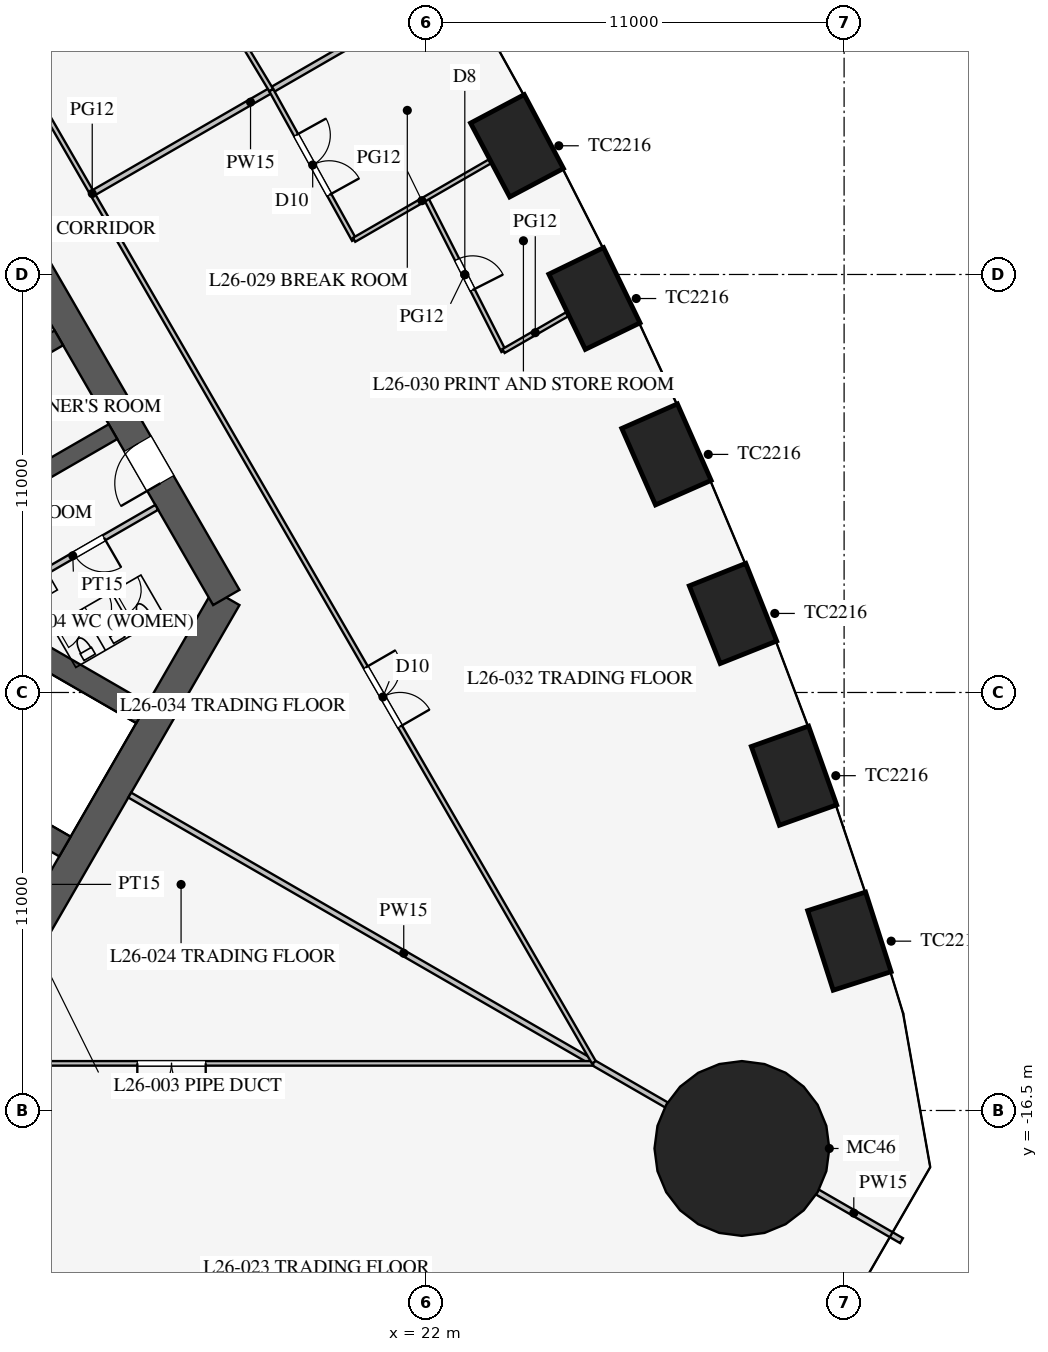
"""IFC4 building model, lengths in metres.
Left out: names, types, materials, properties, quantities, classifications, styles, units other than length and angle.
Written with IfcOpenShell. Run it as: python <this file> out.ifc"""

import sys

from ifc_helpers import new_model, si_unit, direction, frame, frame_2d, origin, origin_2d, place, context, subcontext, project, spatial, rectangle, circle, extrude, element, fill, save


model = new_model("IFC4")
c1 = context("Model", 3, precision=1e-05, world=origin(), true_north=direction((0.0, 1.0)))
c2 = subcontext(c1, "Body", "Model", "MODEL_VIEW")
j1 = project(units=[si_unit("LENGTHUNIT", "METRE"), si_unit("PLANEANGLEUNIT", "RADIAN")], contexts=[c1])
p1 = place(None, origin())
s1 = spatial("IfcSite", under=j1, at=p1, CompositionType="ELEMENT")
p2 = place(p1, origin())
s2 = spatial("IfcBuilding", under=s1, at=p2, CompositionType="ELEMENT")
p3 = place(p2, frame((0.0, 0.0, 115.7)))
s3 = spatial("IfcBuildingStorey", under=s2, at=p3, CompositionType="ELEMENT", Elevation=115.7)
for number, where, z_axis, x_axis in (
    (1, (33.139, -12.044, 0.0), (0.0, 0.0, 1.0), (-0.305, 0.952, 0.0)),
    (2, (31.682, -7.689, 0.0), (0.0, 0.0, 1.0), (-0.336, 0.942, 0.0)),
    (3, (30.077, -3.42, 0.0), (0.0, 0.0, 1.0), (-0.37, 0.929, 0.0)),
    (4, (28.325, 0.765, 0.0), (0.0, 0.0, 1.0), (-0.403, 0.915, 0.0)),
    (5, (26.43, 4.867, 0.0), (0.0, 0.0, 1.0), (-0.436, 0.9, 0.0)),
    (6, (24.393, 8.887, 0.0), (0.0, 0.0, 1.0), (-0.468, 0.883, 0.0)),
):
    element("IfcColumn", number, at=place(p3, frame(where, z_axis=z_axis, x_axis=x_axis)), inside=s3, PredefinedType="COLUMN", context=c2, shape_type="SweptSolid", body=[
        extrude(rectangle(XDim=2.2, YDim=1.6, at=origin_2d()), origin(), (0.0, 0.0, 1.0), 4.2),
    ])
p4 = place(p3, frame((30.311, -17.5, 0.0), z_axis=(0.0, 0.0, 1.0), x_axis=(1.0, 0.0, 0.0)))
e7 = element("IfcColumn", 7, at=p4, inside=s3, PredefinedType="COLUMN", context=c2, shape_type="SweptSolid", body=[
    extrude(circle(Radius=2.3, at=origin_2d()), origin(), (0.0, 0.0, 1.0), 4.2),
])
p5 = place(p3, frame((10.97, -13.0, 0.0), z_axis=(0.0, 0.0, 1.0), x_axis=(0.499995765644, 0.866027848477, 0.0)))
e8 = element("IfcWall", 8, at=p5, inside=s3, PredefinedType="SHEAR", context=c2, shape_type="SweptSolid", body=[
    extrude(rectangle(XDim=11.547, YDim=0.8, at=frame_2d((5.773, 0.0))), origin(), (0.0, 0.0, 1.0), 4.2),
])
p6 = place(p3, frame((16.743, -3.0, 0.0), z_axis=(0.0, 0.0, 1.0), x_axis=(-0.500002442456, 0.866023993627, 0.0)))
e9 = element("IfcWall", 9, at=p6, inside=s3, PredefinedType="SHEAR", context=c2, shape_type="SweptSolid", body=[
    extrude(rectangle(XDim=21.939, YDim=0.8, at=frame_2d((10.97, 0.0))), origin(), (0.0, 0.0, 1.0), 4.2),
])
p7 = place(p6, frame((17.27, 0.0, 0.0)))
e10 = element("IfcOpeningElement", 10, at=p7, cuts=e9, PredefinedType="OPENING", context=c2, shape_type="SweptSolid", body=[
    extrude(rectangle(XDim=1.2, YDim=2.1, at=frame_2d((0.6, 1.05))), frame((0.0, 0.41, 0.0), z_axis=(0.0, -1.0, 0.0), x_axis=(1.0, 0.0, 0.0)), (0.0, 0.0, 1.0), 0.82),
])
p8 = place(p6, frame((3.47, 0.0, 0.0)))
e11 = element("IfcOpeningElement", 11, at=p8, cuts=e9, PredefinedType="OPENING", context=c2, shape_type="SweptSolid", body=[
    extrude(rectangle(XDim=1.2, YDim=2.1, at=frame_2d((0.6, 1.05))), frame((0.0, 0.41, 0.0), z_axis=(0.0, -1.0, 0.0), x_axis=(1.0, 0.0, 0.0)), (0.0, 0.0, 1.0), 0.82),
])
for number, where, z_axis, x_axis in (
    (12, (11.532, 0.076, 0.0), (0.0, 0.0, 1.0), (0.866, 0.5, 0.0)),
    (13, (10.107, 2.544, 0.0), (0.0, 0.0, 1.0), (0.866, 0.5, 0.0)),
):
    element("IfcWall", number, at=place(p3, frame(where, z_axis=z_axis, x_axis=x_axis)), inside=s3, PredefinedType="SHEAR", context=c2, shape_type="SweptSolid", body=[
        extrude(rectangle(XDim=2.575, YDim=0.45, at=frame_2d((1.288, 0.0))), origin(), (0.0, 0.0, 1.0), 4.2),
    ])
for number, where, z_axis, x_axis in (
    (14, (4.638, -5.016, 0.0), (0.0, 0.0, 1.0), (0.866, -0.5, 0.0)),
    (15, (6.663, -1.509, 0.0), (0.0, 0.0, 1.0), (0.866, -0.5, 0.0)),
):
    element("IfcWall", number, at=place(p3, frame(where, z_axis=z_axis, x_axis=x_axis)), inside=s3, PredefinedType="SHEAR", context=c2, shape_type="SweptSolid", body=[
        extrude(rectangle(XDim=9.075, YDim=0.6, at=frame_2d((4.538, 0.0))), origin(), (0.0, 0.0, 1.0), 4.2),
    ])
p9 = place(p3, frame((10.495, -3.178, 0.0), z_axis=(0.0, 0.0, 1.0), x_axis=(0.86602216432, 0.500005610874, 0.0)))
e16 = element("IfcWall", 16, at=p9, inside=s3, PredefinedType="PARTITIONING", context=c2, shape_type="SweptSolid", body=[
    extrude(rectangle(XDim=5.1, YDim=0.15, at=frame_2d((2.55, 0.0))), origin(), (0.0, 0.0, 1.0), 4.0),
])
p10 = place(p9, frame((2.6, 0.0, 0.0)))
e17 = element("IfcOpeningElement", 17, at=p10, cuts=e16, PredefinedType="OPENING", context=c2, shape_type="SweptSolid", body=[
    extrude(rectangle(XDim=0.9, YDim=2.1, at=frame_2d((0.45, 1.05))), frame((0.0, 0.085, 0.0), z_axis=(0.0, -1.0, 0.0), x_axis=(1.0, 0.0, 0.0)), (0.0, 0.0, 1.0), 0.17),
])
p11 = place(p3, frame((14.203, -8.2, 0.0), z_axis=(0.0, 0.0, 1.0), x_axis=(0.866024668836, -0.500001272966, 0.0)))
e18 = element("IfcWall", 18, at=p11, inside=s3, PredefinedType="PARTITIONING", context=c2, shape_type="SweptSolid", body=[
    extrude(rectangle(XDim=16.65, YDim=0.15, at=frame_2d((8.325, 0.0))), origin(), (0.0, 0.0, 1.0), 2.3),
])
p12 = place(p3, frame((32.0, -18.475, 0.0), z_axis=(0.0, 0.0, 1.0), x_axis=(0.866042548026, -0.499970304126, 0.0)))
e19 = element("IfcWall", 19, at=p12, inside=s3, PredefinedType="PARTITIONING", context=c2, shape_type="SweptSolid", body=[
    extrude(rectangle(XDim=2.899, YDim=0.15, at=frame_2d((1.45, 0.0))), origin(), (0.0, 0.0, 1.0), 2.3),
])
p13 = place(p3, frame((-26.398, -15.26, 0.0), z_axis=(0.0, 0.0, 1.0), x_axis=(1.0, 0.0, 0.0)))
e20 = element("IfcWall", 20, at=p13, inside=s3, PredefinedType="PARTITIONING", context=c2, shape_type="SweptSolid", body=[
    extrude(rectangle(XDim=52.796, YDim=0.12, at=frame_2d((26.398, 0.0))), origin(), (0.0, 0.0, 1.0), 2.9),
])
p14 = place(p13, frame((10.2, 0.0, 0.15)))
e21 = element("IfcOpeningElement", 21, at=p14, cuts=e20, PredefinedType="OPENING", context=c2, shape_type="SweptSolid", body=[
    extrude(rectangle(XDim=1.8, YDim=2.1, at=frame_2d((0.9, 1.05))), frame((0.0, 0.07, 0.0), z_axis=(0.0, -1.0, 0.0), x_axis=(1.0, 0.0, 0.0)), (0.0, 0.0, 1.0), 0.14),
])
p15 = place(p13, frame((40.8, 0.0, 0.15)))
e22 = element("IfcOpeningElement", 22, at=p15, cuts=e20, PredefinedType="OPENING", context=c2, shape_type="SweptSolid", body=[
    extrude(rectangle(XDim=1.8, YDim=2.1, at=frame_2d((0.9, 1.05))), frame((0.0, 0.07, 0.0), z_axis=(0.0, -1.0, 0.0), x_axis=(1.0, 0.0, 0.0)), (0.0, 0.0, 1.0), 0.14),
])
p16 = place(p3, frame((13.268, 7.66, 0.0), z_axis=(0.0, 0.0, 1.0), x_axis=(0.866013963754, 0.500019814191, 0.0)))
e23 = element("IfcWall", 23, at=p16, inside=s3, PredefinedType="PARTITIONING", context=c2, shape_type="SweptSolid", body=[
    extrude(rectangle(XDim=9.5, YDim=0.15, at=frame_2d((4.75, 0.0))), origin(), (0.0, 0.0, 1.0), 3.2),
])
p17 = place(p3, frame((26.415, -15.231, 0.0), z_axis=(0.0, 0.0, 1.0), x_axis=(-0.50000091641, 0.866024874695, 0.0)))
e24 = element("IfcWall", 24, at=p17, inside=s3, PredefinedType="PARTITIONING", context=c2, shape_type="SweptSolid", body=[
    extrude(rectangle(XDim=52.796, YDim=0.12, at=frame_2d((26.398, 0.0))), origin(), (0.0, 0.0, 1.0), 2.9),
])
p18 = place(p17, frame((10.2, 0.0, 0.15)))
e25 = element("IfcOpeningElement", 25, at=p18, cuts=e24, PredefinedType="OPENING", context=c2, shape_type="SweptSolid", body=[
    extrude(rectangle(XDim=1.8, YDim=2.1, at=frame_2d((0.9, 1.05))), frame((0.0, 0.07, 0.0), z_axis=(0.0, -1.0, 0.0), x_axis=(1.0, 0.0, 0.0)), (0.0, 0.0, 1.0), 0.14),
])
p19 = place(p17, frame((40.8, 0.0, 0.15)))
e26 = element("IfcOpeningElement", 26, at=p19, cuts=e24, PredefinedType="OPENING", context=c2, shape_type="SweptSolid", body=[
    extrude(rectangle(XDim=1.8, YDim=2.1, at=frame_2d((0.9, 1.05))), frame((0.0, 0.07, 0.0), z_axis=(0.0, -1.0, 0.0), x_axis=(1.0, 0.0, 0.0)), (0.0, 0.0, 1.0), 0.14),
])
p20 = place(p3, frame((17.927, 10.35, 0.0), z_axis=(0.0, 0.0, 1.0), x_axis=(-0.515548366618, 0.856860479703, 0.0)))
e27 = element("IfcWall", 27, at=p20, inside=s3, PredefinedType="PARTITIONING", context=c2, shape_type="SweptSolid", body=[
    extrude(rectangle(XDim=4.501, YDim=0.12, at=frame_2d((2.25, 0.0))), origin(), (0.0, 0.0, 1.0), 2.9),
])
p21 = place(p20, frame((1.75, 0.0, 0.15)))
e28 = element("IfcOpeningElement", 28, at=p21, cuts=e27, PredefinedType="OPENING", context=c2, shape_type="SweptSolid", body=[
    extrude(rectangle(XDim=1.0, YDim=2.1, at=frame_2d((0.5, 1.05))), frame((0.0, 0.07, 0.0), z_axis=(0.0, -1.0, 0.0), x_axis=(1.0, 0.0, 0.0)), (0.0, 0.0, 1.0), 0.14),
])
p22 = place(p3, frame((20.106, 6.412, 0.0), z_axis=(0.0, 0.0, 1.0), x_axis=(-0.484292898211, 0.874905931368, 0.0)))
e29 = element("IfcWall", 29, at=p22, inside=s3, PredefinedType="PARTITIONING", context=c2, shape_type="SweptSolid", body=[
    extrude(rectangle(XDim=4.501, YDim=0.12, at=frame_2d((2.25, 0.0))), origin(), (0.0, 0.0, 1.0), 2.9),
])
p23 = place(p22, frame((1.35, 0.0, 0.15)))
e30 = element("IfcOpeningElement", 30, at=p23, cuts=e29, PredefinedType="OPENING", context=c2, shape_type="SweptSolid", body=[
    extrude(rectangle(XDim=1.8, YDim=2.1, at=frame_2d((0.9, 1.05))), frame((0.0, 0.07, 0.0), z_axis=(0.0, -1.0, 0.0), x_axis=(1.0, 0.0, 0.0)), (0.0, 0.0, 1.0), 0.14),
])
p24 = place(p3, frame((24.037, 3.486, 0.0), z_axis=(0.0, 0.0, 1.0), x_axis=(-0.452428593635, 0.891800632239, 0.0)))
e31 = element("IfcWall", 31, at=p24, inside=s3, PredefinedType="PARTITIONING", context=c2, shape_type="SweptSolid", body=[
    extrude(rectangle(XDim=4.506, YDim=0.12, at=frame_2d((2.253, 0.0))), origin(), (0.0, 0.0, 1.0), 2.9),
])
p25 = place(p24, frame((1.8, 0.0, 0.15)))
e32 = element("IfcOpeningElement", 32, at=p25, cuts=e31, PredefinedType="OPENING", context=c2, shape_type="SweptSolid", body=[
    extrude(rectangle(XDim=0.9, YDim=2.1, at=frame_2d((0.45, 1.05))), frame((0.0, 0.07, 0.0), z_axis=(0.0, -1.0, 0.0), x_axis=(1.0, 0.0, 0.0)), (0.0, 0.0, 1.0), 0.14),
])
p26 = place(p3, frame((20.106, 6.412, 0.0), z_axis=(0.0, 0.0, 1.0), x_axis=(0.866016800201, 0.500014901547, 0.0)))
e33 = element("IfcWall", 33, at=p26, inside=s3, PredefinedType="PARTITIONING", context=c2, shape_type="SweptSolid", body=[
    extrude(rectangle(XDim=4.119, YDim=0.12, at=frame_2d((2.06, 0.0))), origin(), (0.0, 0.0, 1.0), 2.9),
])
p27 = place(p3, frame((24.037, 3.486, 0.0), z_axis=(0.0, 0.0, 1.0), x_axis=(0.866040295995, 0.499974205047, 0.0)))
e34 = element("IfcWall", 34, at=p27, inside=s3, PredefinedType="PARTITIONING", context=c2, shape_type="SweptSolid", body=[
    extrude(rectangle(XDim=1.931, YDim=0.12, at=frame_2d((0.965, 0.0))), origin(), (0.0, 0.0, 1.0), 2.9),
])
p28 = place(p10, frame((0.9, 0.0, 0.0), z_axis=(0.0, 0.0, 1.0), x_axis=(-1.0, 0.0, 0.0)))
e35 = element("IfcDoor", 35, at=p28, inside=s3, OperationType="SINGLE_SWING_LEFT", PredefinedType="DOOR", context=c2, shape_type="SweptSolid", body=[
    extrude(rectangle(XDim=0.9, YDim=2.1, at=frame_2d((0.45, 1.05))), frame((0.0, 0.025, 0.0), z_axis=(0.0, -1.0, 0.0), x_axis=(1.0, 0.0, 0.0)), (0.0, 0.0, 1.0), 0.05),
])
fill(e17, e35)
p29 = place(p8, origin())
e36 = element("IfcDoor", 36, at=p29, inside=s3, OperationType="SINGLE_SWING_LEFT", PredefinedType="DOOR", context=c2, shape_type="SweptSolid", body=[
    extrude(rectangle(XDim=1.2, YDim=2.1, at=frame_2d((0.6, 1.05))), frame((0.0, 0.025, 0.0), z_axis=(0.0, -1.0, 0.0), x_axis=(1.0, 0.0, 0.0)), (0.0, 0.0, 1.0), 0.05),
])
fill(e11, e36)
p30 = place(p15, frame((1.8, 0.0, 0.0), z_axis=(0.0, 0.0, 1.0), x_axis=(-1.0, 0.0, 0.0)))
e37 = element("IfcDoor", 37, at=p30, inside=s3, OperationType="DOUBLE_DOOR_SINGLE_SWING", PredefinedType="DOOR", context=c2, shape_type="SweptSolid", body=[
    extrude(rectangle(XDim=1.8, YDim=2.1, at=frame_2d((0.9, 1.05))), frame((0.0, 0.025, 0.0), z_axis=(0.0, -1.0, 0.0), x_axis=(1.0, 0.0, 0.0)), (0.0, 0.0, 1.0), 0.05),
])
fill(e22, e37)
p31 = place(p23, frame((1.8, 0.0, 0.0), z_axis=(0.0, 0.0, 1.0), x_axis=(-1.0, 0.0, 0.0)))
e38 = element("IfcDoor", 38, at=p31, inside=s3, OperationType="DOUBLE_DOOR_SINGLE_SWING", PredefinedType="DOOR", context=c2, shape_type="SweptSolid", body=[
    extrude(rectangle(XDim=1.8, YDim=2.1, at=frame_2d((0.9, 1.05))), frame((0.0, 0.025, 0.0), z_axis=(0.0, -1.0, 0.0), x_axis=(1.0, 0.0, 0.0)), (0.0, 0.0, 1.0), 0.05),
])
fill(e30, e38)
p32 = place(p25, frame((0.9, 0.0, 0.0), z_axis=(0.0, 0.0, 1.0), x_axis=(-1.0, 0.0, 0.0)))
e39 = element("IfcDoor", 39, at=p32, inside=s3, OperationType="SINGLE_SWING_RIGHT", PredefinedType="DOOR", context=c2, shape_type="SweptSolid", body=[
    extrude(rectangle(XDim=0.9, YDim=2.1, at=frame_2d((0.45, 1.05))), frame((0.0, 0.025, 0.0), z_axis=(0.0, -1.0, 0.0), x_axis=(1.0, 0.0, 0.0)), (0.0, 0.0, 1.0), 0.05),
])
fill(e32, e39)
p33 = place(p18, frame((1.8, 0.0, 0.0), z_axis=(0.0, 0.0, 1.0), x_axis=(-1.0, 0.0, 0.0)))
e40 = element("IfcDoor", 40, at=p33, inside=s3, OperationType="DOUBLE_DOOR_SINGLE_SWING", PredefinedType="DOOR", context=c2, shape_type="SweptSolid", body=[
    extrude(rectangle(XDim=1.8, YDim=2.1, at=frame_2d((0.9, 1.05))), frame((0.0, 0.025, 0.0), z_axis=(0.0, -1.0, 0.0), x_axis=(1.0, 0.0, 0.0)), (0.0, 0.0, 1.0), 0.05),
])
fill(e25, e40)
save(model, sys.argv[1])
